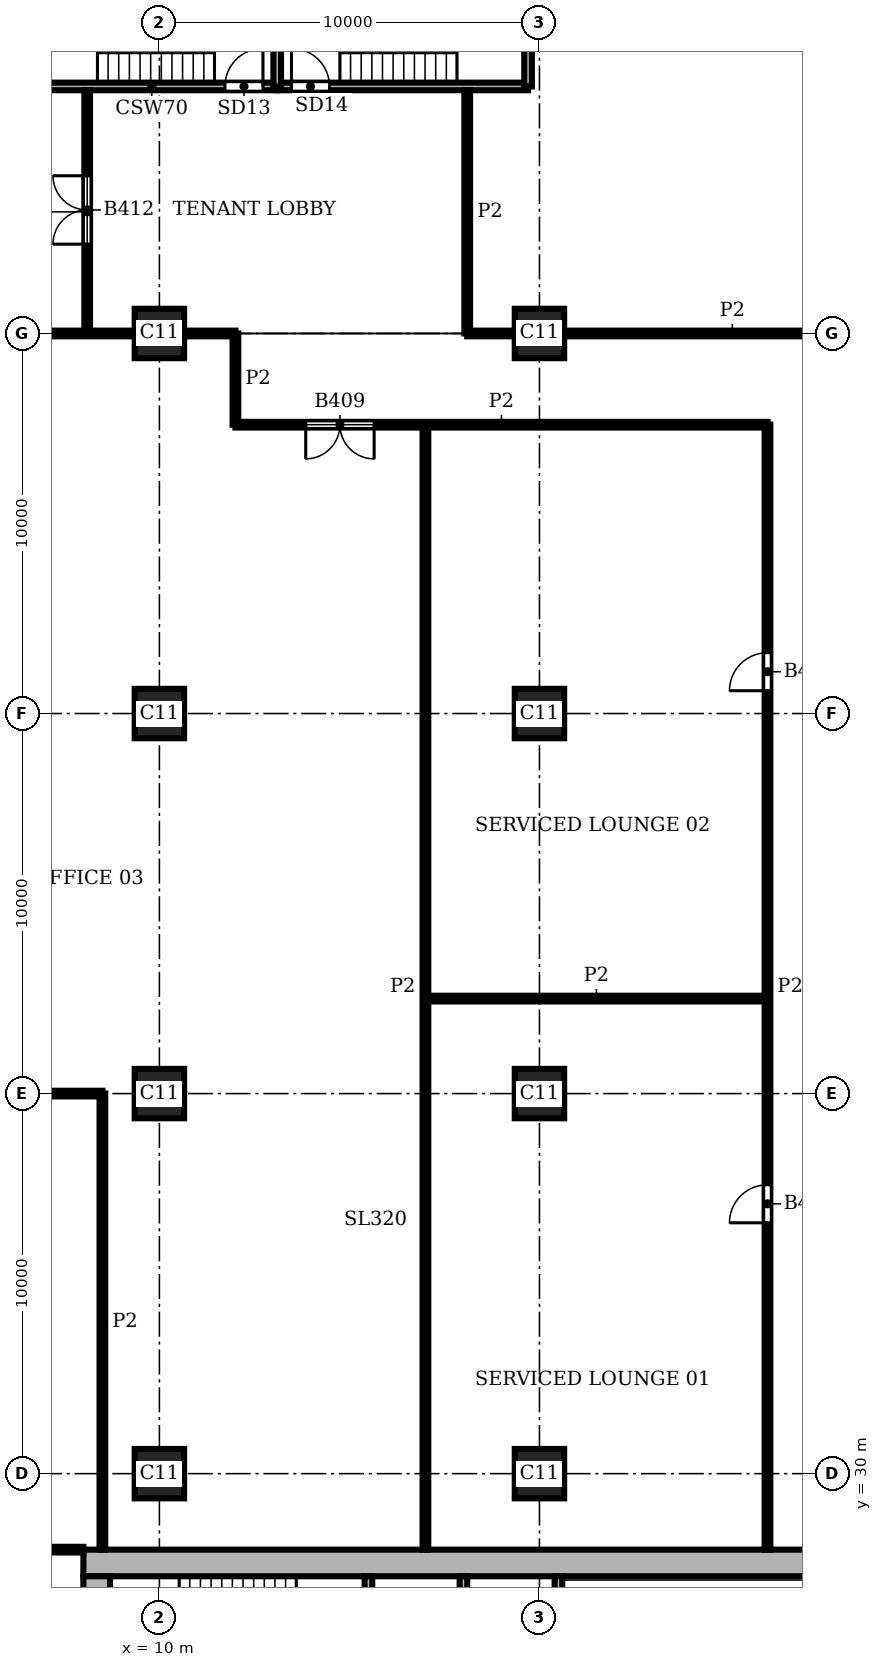
"""IFC4 building model, lengths in metres.
Left out: names, types, materials, properties, quantities, classifications, styles, units other than length and angle.
Written with IfcOpenShell. Run it as: python <this file> out.ifc"""

import sys

from ifc_helpers import new_model, si_unit, direction, frame, frame_2d, origin, origin_2d, place, context, subcontext, project, spatial, rectangle, extrude, element, fill, save


model = new_model("IFC4")
c1 = context("Model", 3, precision=1e-05, world=origin(), true_north=direction((0.0, 1.0)))
c2 = subcontext(c1, "Body", "Model", "MODEL_VIEW")
j1 = project(units=[si_unit("LENGTHUNIT", "METRE"), si_unit("PLANEANGLEUNIT", "RADIAN")], contexts=[c1])
p1 = place(None, origin())
s1 = spatial("IfcSite", under=j1, at=p1, CompositionType="ELEMENT")
p2 = place(p1, origin())
s2 = spatial("IfcBuilding", under=s1, at=p2, CompositionType="ELEMENT")
p3 = place(p2, frame((0.0, 0.0, 166.8)))
s3 = spatial("IfcBuildingStorey", under=s2, at=p3, CompositionType="ELEMENT", Elevation=166.8)
for number, where, z_axis, x_axis in (
    (1, (10.0, 30.0, 0.0), (0.0, 0.0, 1.0), (1.0, 0.0, 0.0)),
    (2, (10.0, 40.0, 0.0), (0.0, 0.0, 1.0), (1.0, 0.0, 0.0)),
    (3, (10.0, 50.0, 0.0), (0.0, 0.0, 1.0), (1.0, 0.0, 0.0)),
    (4, (10.0, 60.0, 0.0), (0.0, 0.0, 1.0), (1.0, 0.0, 0.0)),
    (5, (20.0, 30.0, 0.0), (0.0, 0.0, 1.0), (1.0, 0.0, 0.0)),
    (6, (20.0, 40.0, 0.0), (0.0, 0.0, 1.0), (1.0, 0.0, 0.0)),
    (7, (20.0, 50.0, 0.0), (0.0, 0.0, 1.0), (1.0, 0.0, 0.0)),
    (8, (20.0, 60.0, 0.0), (0.0, 0.0, 1.0), (1.0, 0.0, 0.0)),
):
    element("IfcColumn", number, at=place(p3, frame(where, z_axis=z_axis, x_axis=x_axis)), inside=s3, PredefinedType="COLUMN", context=c2, shape_type="SweptSolid", body=[
        extrude(rectangle(XDim=1.3, YDim=1.3, at=origin_2d()), origin(), (0.0, 0.0, 1.0), 3.9),
    ])
p4 = place(p3, frame((28.0, 27.65, 0.0), z_axis=(0.0, 0.0, 1.0), x_axis=(-1.0, 0.0, 0.0)))
e9 = element("IfcWall", 9, at=p4, inside=s3, PredefinedType="SHEAR", context=c2, shape_type="SweptSolid", body=[
    extrude(rectangle(XDim=20.0, YDim=0.7, at=frame_2d((10.0, 0.0))), origin(), (0.0, 0.0, 1.0), 3.9),
])
p5 = place(p3, frame((8.35, 27.3, 0.0), z_axis=(0.0, 0.0, 1.0), x_axis=(0.0, -1.0, 0.0)))
e10 = element("IfcWall", 10, at=p5, inside=s3, PredefinedType="SHEAR", context=c2, shape_type="SweptSolid", body=[
    extrude(rectangle(XDim=18.6, YDim=0.7, at=frame_2d((9.3, 0.0))), origin(), (0.0, 0.0, 1.0), 3.9),
])
p6 = place(p3, frame((29.357, 66.434, 0.0), z_axis=(0.0, 0.0, 1.0), x_axis=(-0.555541552266, 0.831488775454, 0.0)))
e11 = element("IfcWall", 11, at=p6, inside=s3, PredefinedType="SOLIDWALL", context=c2, shape_type="SweptSolid", body=[
    extrude(rectangle(XDim=4.753, YDim=0.4, at=frame_2d((2.376, 0.0))), origin(), (0.0, 0.0, 1.0), 3.9),
])
p7 = place(p6, frame((0.226, 0.0, 0.9)))
e12 = element("IfcOpeningElement", 12, at=p7, cuts=e11, PredefinedType="OPENING", context=c2, shape_type="SweptSolid", body=[
    extrude(rectangle(XDim=4.3, YDim=2.35, at=frame_2d((2.15, 1.175))), frame((0.0, 0.21, 0.0), z_axis=(0.0, -1.0, 0.0), x_axis=(1.0, 0.0, 0.0)), (0.0, 0.0, 1.0), 0.42),
])
p8 = place(p3, frame((6.5, 66.5, 0.0), z_axis=(0.0, 0.0, 1.0), x_axis=(1.0, 0.0, 0.0)))
e13 = element("IfcWall", 13, at=p8, inside=s3, PredefinedType="SHEAR", context=c2, shape_type="SweptSolid", body=[
    extrude(rectangle(XDim=6.6, YDim=0.2, at=frame_2d((3.3, 0.0))), origin(), (0.0, 0.0, 1.0), 3.58),
])
p9 = place(p8, frame((5.225, 0.0, 0.0)))
e14 = element("IfcOpeningElement", 14, at=p9, cuts=e13, PredefinedType="OPENING", context=c2, shape_type="SweptSolid", body=[
    extrude(rectangle(XDim=1.0, YDim=2.1, at=frame_2d((0.5, 1.05))), frame((0.0, 0.11, 0.0), z_axis=(0.0, -1.0, 0.0), x_axis=(1.0, 0.0, 0.0)), (0.0, 0.0, 1.0), 0.22),
])
p10 = place(p3, frame((13.1, 66.5, 0.0), z_axis=(0.0, 0.0, 1.0), x_axis=(1.0, 0.0, 0.0)))
e15 = element("IfcWall", 15, at=p10, inside=s3, PredefinedType="SHEAR", context=c2, shape_type="SweptSolid", body=[
    extrude(rectangle(XDim=6.6, YDim=0.2, at=frame_2d((3.3, 0.0))), origin(), (0.0, 0.0, 1.0), 3.58),
])
p11 = place(p10, frame((0.375, 0.0, 0.0)))
e16 = element("IfcOpeningElement", 16, at=p11, cuts=e15, PredefinedType="OPENING", context=c2, shape_type="SweptSolid", body=[
    extrude(rectangle(XDim=1.0, YDim=2.1, at=frame_2d((0.5, 1.05))), frame((0.0, 0.11, 0.0), z_axis=(0.0, -1.0, 0.0), x_axis=(1.0, 0.0, 0.0)), (0.0, 0.0, 1.0), 0.22),
])
p12 = place(p3, frame((13.1, 66.5, 0.0), z_axis=(0.0, 0.0, 1.0), x_axis=(0.0, 1.0, 0.0)))
e17 = element("IfcWall", 17, at=p12, inside=s3, PredefinedType="SHEAR", context=c2, shape_type="SweptSolid", body=[
    extrude(rectangle(XDim=3.3, YDim=0.2, at=frame_2d((1.65, 0.0))), origin(), (0.0, 0.0, 1.0), 3.58),
])
p13 = place(p3, frame((15.5, 23.6, 0.0), z_axis=(0.0, 0.0, 1.0), x_axis=(0.0, 1.0, 0.0)))
e18 = element("IfcWall", 18, at=p13, inside=s3, PredefinedType="SHEAR", context=c2, shape_type="SweptSolid", body=[
    extrude(rectangle(XDim=3.7, YDim=0.2, at=frame_2d((1.85, 0.0))), origin(), (0.0, 0.0, 1.0), 3.58),
])
p14 = place(p3, frame((18.0, 20.0, 0.0), z_axis=(0.0, 0.0, 1.0), x_axis=(0.0, 1.0, 0.0)))
e19 = element("IfcWall", 19, at=p14, inside=s3, PredefinedType="SHEAR", context=c2, shape_type="SweptSolid", body=[
    extrude(rectangle(XDim=7.3, YDim=0.2, at=frame_2d((3.65, 0.0))), origin(), (0.0, 0.0, 1.0), 3.58),
])
p15 = place(p14, frame((1.2, 0.0, 0.0)))
e20 = element("IfcOpeningElement", 20, at=p15, cuts=e19, PredefinedType="OPENING", context=c2, shape_type="SweptSolid", body=[
    extrude(rectangle(XDim=1.2, YDim=2.1, at=frame_2d((0.6, 1.05))), frame((0.0, 0.11, 0.0), z_axis=(0.0, -1.0, 0.0), x_axis=(1.0, 0.0, 0.0)), (0.0, 0.0, 1.0), 0.22),
])
p16 = place(p3, frame((19.7, 66.5, 0.0), z_axis=(0.0, 0.0, 1.0), x_axis=(0.0, 1.0, 0.0)))
e21 = element("IfcWall", 21, at=p16, inside=s3, PredefinedType="SHEAR", context=c2, shape_type="SweptSolid", body=[
    extrude(rectangle(XDim=3.3, YDim=0.2, at=frame_2d((1.65, 0.0))), origin(), (0.0, 0.0, 1.0), 3.58),
])
p17 = place(p3, frame((20.5, 23.6, 0.0), z_axis=(0.0, 0.0, 1.0), x_axis=(0.0, 1.0, 0.0)))
e22 = element("IfcWall", 22, at=p17, inside=s3, PredefinedType="SHEAR", context=c2, shape_type="SweptSolid", body=[
    extrude(rectangle(XDim=3.7, YDim=0.2, at=frame_2d((1.85, 0.0))), origin(), (0.0, 0.0, 1.0), 3.58),
])
p18 = place(p3, frame((8.1, 60.0, 0.0), z_axis=(0.0, 0.0, 1.0), x_axis=(0.0, 1.0, 0.0)))
e23 = element("IfcWall", 23, at=p18, inside=s3, PredefinedType="PARTITIONING", context=c2, shape_type="SweptSolid", body=[
    extrude(rectangle(XDim=6.4, YDim=0.15, at=frame_2d((3.2, 0.0))), origin(), (0.0, 0.0, 1.0), 3.58),
])
p19 = place(p18, frame((2.35, 0.0, 0.0)))
e24 = element("IfcOpeningElement", 24, at=p19, cuts=e23, PredefinedType="OPENING", context=c2, shape_type="SweptSolid", body=[
    extrude(rectangle(XDim=1.8, YDim=2.1, at=frame_2d((0.9, 1.05))), frame((0.0, 0.085, 0.0), z_axis=(0.0, -1.0, 0.0), x_axis=(1.0, 0.0, 0.0)), (0.0, 0.0, 1.0), 0.17),
])
p20 = place(p3, frame((8.5, 28.0, 0.0), z_axis=(0.0, 0.0, 1.0), x_axis=(0.0, 1.0, 0.0)))
e25 = element("IfcWall", 25, at=p20, inside=s3, PredefinedType="PARTITIONING", context=c2, shape_type="SweptSolid", body=[
    extrude(rectangle(XDim=12.0, YDim=0.15, at=frame_2d((6.0, 0.0))), origin(), (0.0, 0.0, 1.0), 3.58),
])
p21 = place(p3, frame((12.0, 57.6, 0.0), z_axis=(0.0, 0.0, 1.0), x_axis=(0.0, 1.0, 0.0)))
e26 = element("IfcWall", 26, at=p21, inside=s3, PredefinedType="PARTITIONING", context=c2, shape_type="SweptSolid", body=[
    extrude(rectangle(XDim=2.4, YDim=0.15, at=frame_2d((1.2, 0.0))), origin(), (0.0, 0.0, 1.0), 3.58),
])
p22 = place(p3, frame((17.0, 28.0, 0.0), z_axis=(0.0, 0.0, 1.0), x_axis=(0.0, 1.0, 0.0)))
e27 = element("IfcWall", 27, at=p22, inside=s3, PredefinedType="PARTITIONING", context=c2, shape_type="SweptSolid", body=[
    extrude(rectangle(XDim=29.6, YDim=0.15, at=frame_2d((14.8, 0.0))), origin(), (0.0, 0.0, 1.0), 3.58),
])
p23 = place(p3, frame((18.1, 60.0, 0.0), z_axis=(0.0, 0.0, 1.0), x_axis=(0.0, 1.0, 0.0)))
e28 = element("IfcWall", 28, at=p23, inside=s3, PredefinedType="PARTITIONING", context=c2, shape_type="SweptSolid", body=[
    extrude(rectangle(XDim=6.4, YDim=0.15, at=frame_2d((3.2, 0.0))), origin(), (0.0, 0.0, 1.0), 3.58),
])
p24 = place(p3, frame((26.0, 28.0, 0.0), z_axis=(0.0, 0.0, 1.0), x_axis=(0.0, 1.0, 0.0)))
e29 = element("IfcWall", 29, at=p24, inside=s3, PredefinedType="PARTITIONING", context=c2, shape_type="SweptSolid", body=[
    extrude(rectangle(XDim=29.6, YDim=0.15, at=frame_2d((14.8, 0.0))), origin(), (0.0, 0.0, 1.0), 3.58),
])
p25 = place(p24, frame((8.6, 0.0, 0.0)))
e30 = element("IfcOpeningElement", 30, at=p25, cuts=e29, PredefinedType="OPENING", context=c2, shape_type="SweptSolid", body=[
    extrude(rectangle(XDim=1.0, YDim=2.1, at=frame_2d((0.5, 1.05))), frame((0.0, 0.085, 0.0), z_axis=(0.0, -1.0, 0.0), x_axis=(1.0, 0.0, 0.0)), (0.0, 0.0, 1.0), 0.17),
])
p26 = place(p24, frame((22.6, 0.0, 0.0)))
e31 = element("IfcOpeningElement", 31, at=p26, cuts=e29, PredefinedType="OPENING", context=c2, shape_type="SweptSolid", body=[
    extrude(rectangle(XDim=1.0, YDim=2.1, at=frame_2d((0.5, 1.05))), frame((0.0, 0.085, 0.0), z_axis=(0.0, -1.0, 0.0), x_axis=(1.0, 0.0, 0.0)), (0.0, 0.0, 1.0), 0.17),
])
p27 = place(p3, frame((5.6, 28.0, 0.0), z_axis=(0.0, 0.0, 1.0), x_axis=(1.0, 0.0, 0.0)))
e32 = element("IfcWall", 32, at=p27, inside=s3, PredefinedType="PARTITIONING", context=c2, shape_type="SweptSolid", body=[
    extrude(rectangle(XDim=2.4, YDim=0.15, at=frame_2d((1.2, 0.0))), origin(), (0.0, 0.0, 1.0), 3.58),
])
p28 = place(p3, frame((0.45, 40.0, 0.0), z_axis=(0.0, 0.0, 1.0), x_axis=(1.0, 0.0, 0.0)))
e33 = element("IfcWall", 33, at=p28, inside=s3, PredefinedType="PARTITIONING", context=c2, shape_type="SweptSolid", body=[
    extrude(rectangle(XDim=8.05, YDim=0.15, at=frame_2d((4.025, 0.0))), origin(), (0.0, 0.0, 1.0), 3.58),
])
p29 = place(p3, frame((17.0, 42.5, 0.0), z_axis=(0.0, 0.0, 1.0), x_axis=(1.0, 0.0, 0.0)))
e34 = element("IfcWall", 34, at=p29, inside=s3, PredefinedType="PARTITIONING", context=c2, shape_type="SweptSolid", body=[
    extrude(rectangle(XDim=9.0, YDim=0.15, at=frame_2d((4.5, 0.0))), origin(), (0.0, 0.0, 1.0), 3.58),
])
p30 = place(p3, frame((12.0, 57.6, 0.0), z_axis=(0.0, 0.0, 1.0), x_axis=(1.0, 0.0, 0.0)))
e35 = element("IfcWall", 35, at=p30, inside=s3, PredefinedType="PARTITIONING", context=c2, shape_type="SweptSolid", body=[
    extrude(rectangle(XDim=14.0, YDim=0.15, at=frame_2d((7.0, 0.0))), origin(), (0.0, 0.0, 1.0), 3.58),
])
p31 = place(p30, frame((1.85, 0.0, 0.0)))
e36 = element("IfcOpeningElement", 36, at=p31, cuts=e35, PredefinedType="OPENING", context=c2, shape_type="SweptSolid", body=[
    extrude(rectangle(XDim=1.8, YDim=2.1, at=frame_2d((0.9, 1.05))), frame((0.0, 0.085, 0.0), z_axis=(0.0, -1.0, 0.0), x_axis=(1.0, 0.0, 0.0)), (0.0, 0.0, 1.0), 0.17),
])
p32 = place(p3, frame((0.5, 60.0, 0.0), z_axis=(0.0, 0.0, 1.0), x_axis=(1.0, 0.0, 0.0)))
e37 = element("IfcWall", 37, at=p32, inside=s3, PredefinedType="PARTITIONING", context=c2, shape_type="SweptSolid", body=[
    extrude(rectangle(XDim=8.85, YDim=0.15, at=frame_2d((4.425, 0.0))), origin(), (0.0, 0.0, 1.0), 3.58),
])
p33 = place(p3, frame((10.65, 60.0, 0.0), z_axis=(0.0, 0.0, 1.0), x_axis=(1.0, 0.0, 0.0)))
e38 = element("IfcWall", 38, at=p33, inside=s3, PredefinedType="PARTITIONING", context=c2, shape_type="SweptSolid", body=[
    extrude(rectangle(XDim=1.35, YDim=0.15, at=frame_2d((0.675, 0.0))), origin(), (0.0, 0.0, 1.0), 3.58),
])
p34 = place(p3, frame((18.1, 60.0, 0.0), z_axis=(0.0, 0.0, 1.0), x_axis=(1.0, 0.0, 0.0)))
e39 = element("IfcWall", 39, at=p34, inside=s3, PredefinedType="PARTITIONING", context=c2, shape_type="SweptSolid", body=[
    extrude(rectangle(XDim=1.25, YDim=0.15, at=frame_2d((0.625, 0.0))), origin(), (0.0, 0.0, 1.0), 3.58),
])
p35 = place(p3, frame((20.65, 60.0, 0.0), z_axis=(0.0, 0.0, 1.0), x_axis=(1.0, 0.0, 0.0)))
e40 = element("IfcWall", 40, at=p35, inside=s3, PredefinedType="PARTITIONING", context=c2, shape_type="SweptSolid", body=[
    extrude(rectangle(XDim=8.85, YDim=0.15, at=frame_2d((4.425, 0.0))), origin(), (0.0, 0.0, 1.0), 3.58),
])
p36 = place(p7, origin())
e41 = element("IfcWindow", 41, at=p36, inside=s3, PartitioningType="SINGLE_PANEL", PredefinedType="WINDOW", context=c2, shape_type="SweptSolid", body=[
    extrude(rectangle(XDim=4.3, YDim=2.35, at=frame_2d((2.15, 1.175))), frame((0.0, 0.16, 0.0), z_axis=(0.0, -1.0, 0.0), x_axis=(1.0, 0.0, 0.0)), (0.0, 0.0, 1.0), 0.06),
])
fill(e12, e41)
p37 = place(p9, origin())
e42 = element("IfcDoor", 42, at=p37, inside=s3, OperationType="SINGLE_SWING_RIGHT", PredefinedType="DOOR", context=c2, shape_type="SweptSolid", body=[
    extrude(rectangle(XDim=1.0, YDim=2.1, at=frame_2d((0.5, 1.05))), frame((0.0, 0.025, 0.0), z_axis=(0.0, -1.0, 0.0), x_axis=(1.0, 0.0, 0.0)), (0.0, 0.0, 1.0), 0.05),
])
fill(e14, e42)
p38 = place(p11, origin())
e43 = element("IfcDoor", 43, at=p38, inside=s3, OperationType="SINGLE_SWING_LEFT", PredefinedType="DOOR", context=c2, shape_type="SweptSolid", body=[
    extrude(rectangle(XDim=1.0, YDim=2.1, at=frame_2d((0.5, 1.05))), frame((0.0, 0.025, 0.0), z_axis=(0.0, -1.0, 0.0), x_axis=(1.0, 0.0, 0.0)), (0.0, 0.0, 1.0), 0.05),
])
fill(e16, e43)
p39 = place(p25, origin())
e44 = element("IfcDoor", 44, at=p39, inside=s3, OperationType="SINGLE_SWING_LEFT", PredefinedType="DOOR", context=c2, shape_type="SweptSolid", body=[
    extrude(rectangle(XDim=1.0, YDim=2.1, at=frame_2d((0.5, 1.05))), frame((0.0, 0.025, 0.0), z_axis=(0.0, -1.0, 0.0), x_axis=(1.0, 0.0, 0.0)), (0.0, 0.0, 1.0), 0.05),
])
fill(e30, e44)
p40 = place(p26, origin())
e45 = element("IfcDoor", 45, at=p40, inside=s3, OperationType="SINGLE_SWING_LEFT", PredefinedType="DOOR", context=c2, shape_type="SweptSolid", body=[
    extrude(rectangle(XDim=1.0, YDim=2.1, at=frame_2d((0.5, 1.05))), frame((0.0, 0.025, 0.0), z_axis=(0.0, -1.0, 0.0), x_axis=(1.0, 0.0, 0.0)), (0.0, 0.0, 1.0), 0.05),
])
fill(e31, e45)
p41 = place(p31, frame((1.8, 0.0, 0.0), z_axis=(0.0, 0.0, 1.0), x_axis=(-1.0, 0.0, 0.0)))
e46 = element("IfcDoor", 46, at=p41, inside=s3, OperationType="DOUBLE_DOOR_SINGLE_SWING", PredefinedType="DOOR", context=c2, shape_type="SweptSolid", body=[
    extrude(rectangle(XDim=1.8, YDim=2.1, at=frame_2d((0.9, 1.05))), frame((0.0, 0.025, 0.0), z_axis=(0.0, -1.0, 0.0), x_axis=(1.0, 0.0, 0.0)), (0.0, 0.0, 1.0), 0.05),
])
fill(e36, e46)
p42 = place(p19, origin())
e47 = element("IfcDoor", 47, at=p42, inside=s3, OperationType="DOUBLE_DOOR_SINGLE_SWING", PredefinedType="DOOR", context=c2, shape_type="SweptSolid", body=[
    extrude(rectangle(XDim=1.8, YDim=2.1, at=frame_2d((0.9, 1.05))), frame((0.0, 0.025, 0.0), z_axis=(0.0, -1.0, 0.0), x_axis=(1.0, 0.0, 0.0)), (0.0, 0.0, 1.0), 0.05),
])
fill(e24, e47)
save(model, sys.argv[1])
